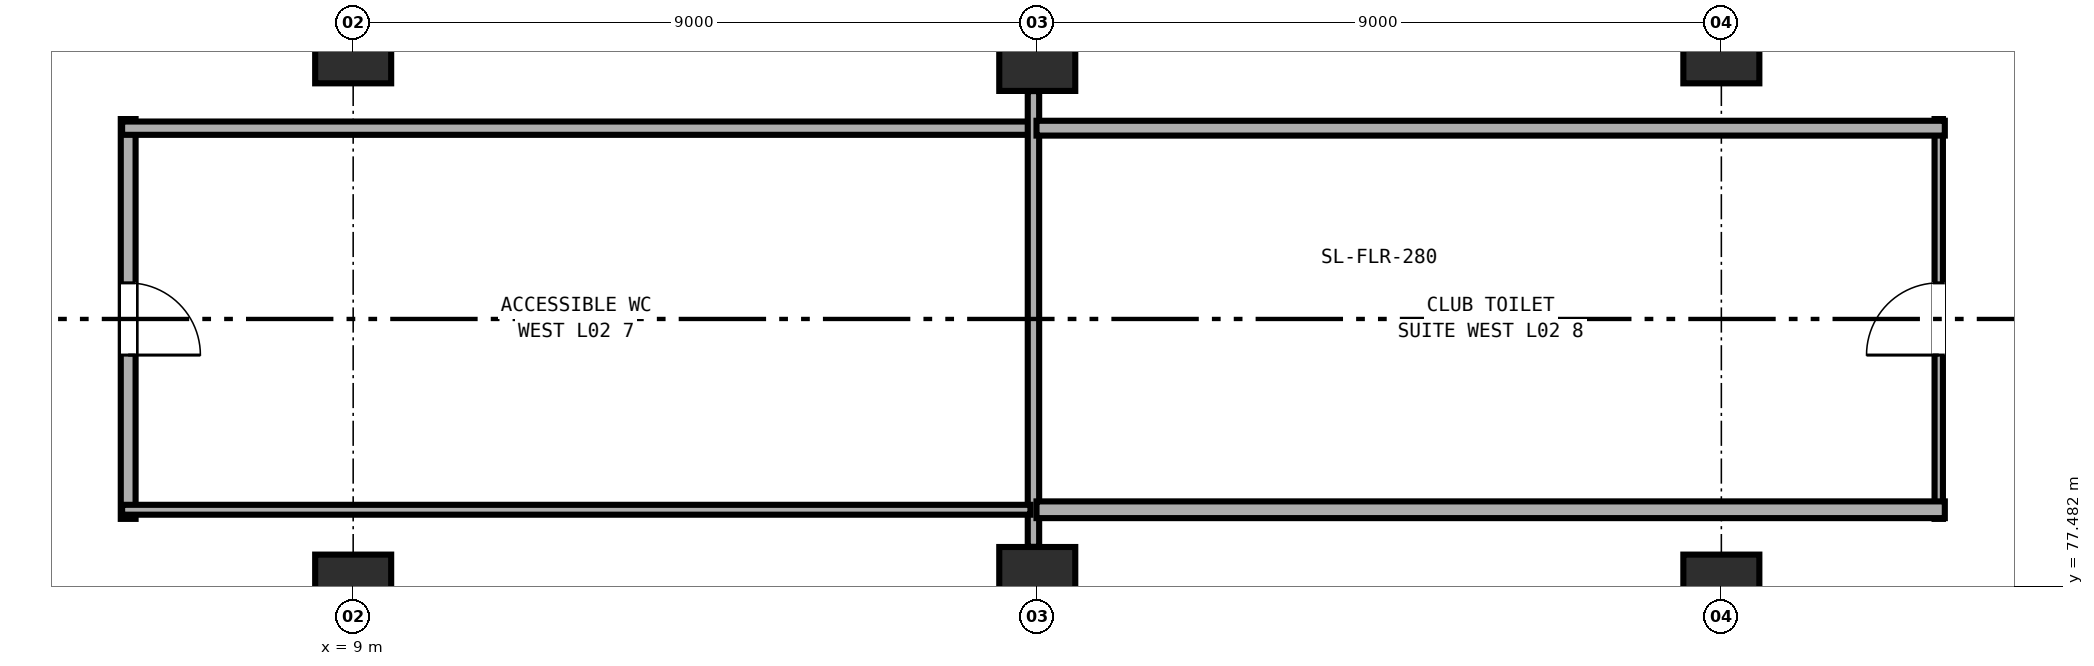
"""IFC4 building model, lengths in metres.
Left out: names, types, materials, properties, quantities, classifications, styles, units other than length and angle.
Written with IfcOpenShell. Run it as: python <this file> out.ifc"""

import sys

from ifc_helpers import new_model, si_unit, direction, frame, frame_2d, origin, origin_2d, place, context, subcontext, project, spatial, rectangle, extrude, element, fill, save


model = new_model("IFC4")
c1 = context("Model", 3, precision=1e-05, world=origin(), true_north=direction((0.0, 1.0)))
c2 = subcontext(c1, "Body", "Model", "MODEL_VIEW")
j1 = project(units=[si_unit("LENGTHUNIT", "METRE"), si_unit("PLANEANGLEUNIT", "RADIAN")], contexts=[c1])
p1 = place(None, origin())
s1 = spatial("IfcSite", under=j1, at=p1, CompositionType="ELEMENT")
p2 = place(p1, origin())
s2 = spatial("IfcBuilding", under=s1, at=p2, CompositionType="ELEMENT")
p3 = place(p2, frame((0.0, 0.0, 9.6)))
s3 = spatial("IfcBuildingStorey", under=s2, at=p3, CompositionType="ELEMENT", Elevation=9.6)
for number, where, z_axis, x_axis in (
    (1, (9.0, 77.4, 0.0), (0.0, 0.0, 1.0), (1.0, 0.0, 0.0)),
    (2, (9.0, 84.6, 0.0), (0.0, 0.0, 1.0), (1.0, 0.0, 0.0)),
):
    element("IfcColumn", number, at=place(p3, frame(where, z_axis=z_axis, x_axis=x_axis)), inside=s3, PredefinedType="COLUMN", context=c2, shape_type="SweptSolid", body=[
        extrude(rectangle(XDim=1.0, YDim=1.0, at=origin_2d()), origin(), (0.0, 0.0, 1.0), 4.8),
    ])
for number, where, z_axis, x_axis in (
    (3, (18.0, 77.4, 0.0), (0.0, 0.0, 1.0), (1.0, 0.0, 0.0)),
    (4, (18.0, 84.6, 0.0), (0.0, 0.0, 1.0), (1.0, 0.0, 0.0)),
):
    element("IfcColumn", number, at=place(p3, frame(where, z_axis=z_axis, x_axis=x_axis)), inside=s3, PredefinedType="COLUMN", context=c2, shape_type="SweptSolid", body=[
        extrude(rectangle(XDim=1.0, YDim=1.2, at=origin_2d()), origin(), (0.0, 0.0, 1.0), 4.8),
    ])
for number, where, z_axis, x_axis in (
    (5, (27.0, 77.4, 0.0), (0.0, 0.0, 1.0), (1.0, 0.0, 0.0)),
    (6, (27.0, 84.6, 0.0), (0.0, 0.0, 1.0), (1.0, 0.0, 0.0)),
):
    element("IfcColumn", number, at=place(p3, frame(where, z_axis=z_axis, x_axis=x_axis)), inside=s3, PredefinedType="COLUMN", context=c2, shape_type="SweptSolid", body=[
        extrude(rectangle(XDim=1.0, YDim=1.0, at=origin_2d()), origin(), (0.0, 0.0, 1.0), 4.8),
    ])
p4 = place(p3, frame((6.04, 83.63, 0.0), z_axis=(0.0, 0.0, 1.0), x_axis=(0.0, -1.0, 0.0)))
e7 = element("IfcWall", 7, at=p4, inside=s3, PredefinedType="PARTITIONING", context=c2, shape_type="SweptSolid", body=[
    extrude(rectangle(XDim=5.26, YDim=0.195, at=frame_2d((2.63, 0.0))), origin(), (0.0, 0.0, 1.0), 3.56),
])
p5 = place(p4, frame((2.155, 0.0, 0.0)))
e8 = element("IfcOpeningElement", 8, at=p5, cuts=e7, PredefinedType="OPENING", context=c2, shape_type="SweptSolid", body=[
    extrude(rectangle(XDim=0.95, YDim=2.1, at=frame_2d((0.475, 1.05))), frame((0.0, 0.107, 0.0), z_axis=(0.0, -1.0, 0.0), x_axis=(1.0, 0.0, 0.0)), (0.0, 0.0, 1.0), 0.215),
])
p6 = place(p3, frame((5.96, 83.51, 0.0), z_axis=(0.0, 0.0, 1.0), x_axis=(1.0, 0.0, 0.0)))
e9 = element("IfcWall", 9, at=p6, inside=s3, PredefinedType="PARTITIONING", context=c2, shape_type="SweptSolid", body=[
    extrude(rectangle(XDim=11.95, YDim=0.175, at=frame_2d((5.975, 0.0))), origin(), (0.0, 0.0, 1.0), 3.56),
])
p7 = place(p3, frame((17.95, 83.998, 0.0), z_axis=(0.0, 0.0, 1.0), x_axis=(0.0, -1.0, 0.0)))
e10 = element("IfcWall", 10, at=p7, inside=s3, PredefinedType="PARTITIONING", context=c2, shape_type="SweptSolid", body=[
    extrude(rectangle(XDim=5.996, YDim=0.15, at=frame_2d((2.998, 0.0))), origin(), (0.0, 0.0, 1.0), 3.56),
])
p8 = place(p3, frame((17.91, 78.49, 0.0), z_axis=(0.0, 0.0, 1.0), x_axis=(-1.0, 0.0, 0.0)))
e11 = element("IfcWall", 11, at=p8, inside=s3, PredefinedType="PARTITIONING", context=c2, shape_type="SweptSolid", body=[
    extrude(rectangle(XDim=11.95, YDim=0.13, at=frame_2d((5.975, 0.0))), origin(), (0.0, 0.0, 1.0), 3.56),
])
p9 = place(p3, frame((29.86, 78.37, 0.0), z_axis=(0.0, 0.0, 1.0), x_axis=(0.0, 1.0, 0.0)))
e12 = element("IfcWall", 12, at=p9, inside=s3, PredefinedType="PARTITIONING", context=c2, shape_type="SweptSolid", body=[
    extrude(rectangle(XDim=5.26, YDim=0.11, at=frame_2d((2.63, 0.0))), origin(), (0.0, 0.0, 1.0), 3.56),
])
p10 = place(p9, frame((2.155, 0.0, 0.0)))
e13 = element("IfcOpeningElement", 13, at=p10, cuts=e12, PredefinedType="OPENING", context=c2, shape_type="SweptSolid", body=[
    extrude(rectangle(XDim=0.95, YDim=2.18, at=frame_2d((0.475, 1.09))), frame((0.0, 0.065, 0.0), z_axis=(0.0, -1.0, 0.0), x_axis=(1.0, 0.0, 0.0)), (0.0, 0.0, 1.0), 0.13),
])
p11 = place(p3, frame((29.94, 78.49, 0.0), z_axis=(0.0, 0.0, 1.0), x_axis=(-1.0, 0.0, 0.0)))
e14 = element("IfcWall", 14, at=p11, inside=s3, PredefinedType="PARTITIONING", context=c2, shape_type="SweptSolid", body=[
    extrude(rectangle(XDim=11.95, YDim=0.22, at=frame_2d((5.975, 0.0))), origin(), (0.0, 0.0, 1.0), 3.56),
])
p12 = place(p3, frame((17.99, 83.51, 0.0), z_axis=(0.0, 0.0, 1.0), x_axis=(1.0, 0.0, 0.0)))
e15 = element("IfcWall", 15, at=p12, inside=s3, PredefinedType="PARTITIONING", context=c2, shape_type="SweptSolid", body=[
    extrude(rectangle(XDim=11.95, YDim=0.195, at=frame_2d((5.975, 0.0))), origin(), (0.0, 0.0, 1.0), 3.56),
])
p13 = place(p5, origin())
e16 = element("IfcDoor", 16, at=p13, inside=s3, OperationType="SINGLE_SWING_RIGHT", PredefinedType="DOOR", context=c2, shape_type="SweptSolid", body=[
    extrude(rectangle(XDim=0.95, YDim=2.1, at=frame_2d((0.475, 1.05))), frame((0.0, 0.025, 0.0), z_axis=(0.0, -1.0, 0.0), x_axis=(1.0, 0.0, 0.0)), (0.0, 0.0, 1.0), 0.05),
])
fill(e8, e16)
p14 = place(p10, origin())
e17 = element("IfcDoor", 17, at=p14, inside=s3, OperationType="SINGLE_SWING_LEFT", PredefinedType="DOOR", context=c2, shape_type="SweptSolid", body=[
    extrude(rectangle(XDim=0.95, YDim=2.18, at=frame_2d((0.475, 1.09))), frame((0.0, 0.025, 0.0), z_axis=(0.0, -1.0, 0.0), x_axis=(1.0, 0.0, 0.0)), (0.0, 0.0, 1.0), 0.05),
])
fill(e13, e17)
save(model, sys.argv[1])
